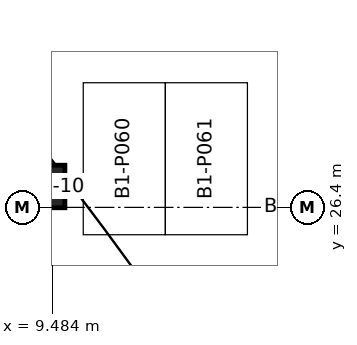
"""IFC4 building model, lengths in metres.
Left out: names, types, materials, properties, quantities, classifications, styles, units other than length and angle.
Written with IfcOpenShell. Run it as: python <this file> out.ifc"""

import sys

from ifc_helpers import new_model, si_unit, direction, frame, frame_2d, origin, origin_2d, place, context, subcontext, project, spatial, rectangle, extrude, element, save


model = new_model("IFC4")
c1 = context("Model", 3, precision=1e-05, world=origin(), true_north=direction((0.0, 1.0)))
c2 = subcontext(c1, "Body", "Model", "MODEL_VIEW")
j1 = project(units=[si_unit("LENGTHUNIT", "METRE"), si_unit("PLANEANGLEUNIT", "RADIAN")], contexts=[c1])
p1 = place(None, origin())
s1 = spatial("IfcSite", under=j1, at=p1, CompositionType="ELEMENT")
p2 = place(p1, origin())
s2 = spatial("IfcBuilding", under=s1, at=p2, CompositionType="ELEMENT")
p3 = place(p2, frame((0.0, 0.0, -4.5)))
s3 = spatial("IfcBuildingStorey", under=s2, at=p3, CompositionType="ELEMENT", Elevation=-4.5)
p4 = place(p3, frame((9.197, 27.087, 0.0), z_axis=(0.0, 0.0, 1.0), x_axis=(-0.609232107146, 0.792991954324, 0.0)))
e1 = element("IfcColumn", 1, at=p4, inside=s3, PredefinedType="COLUMN", context=c2, shape_type="SweptSolid", body=[
    extrude(rectangle(XDim=1.4, YDim=1.4, at=origin_2d()), origin(), (0.0, 0.0, 1.0), 4.5),
])
p5 = place(p3, frame((16.802, 40.787, 0.0), z_axis=(0.0, 0.0, 1.0), x_axis=(0.607919576061, -0.793998607707, 0.0)))
e2 = element("IfcWall", 2, at=p5, inside=s3, PredefinedType="SOLIDWALL", context=c2, shape_type="SweptSolid", body=[
    extrude(rectangle(XDim=12.988, YDim=0.5, at=frame_2d((6.494, 0.0))), origin(), (0.0, 0.0, 1.0), 4.5),
])
save(model, sys.argv[1])
